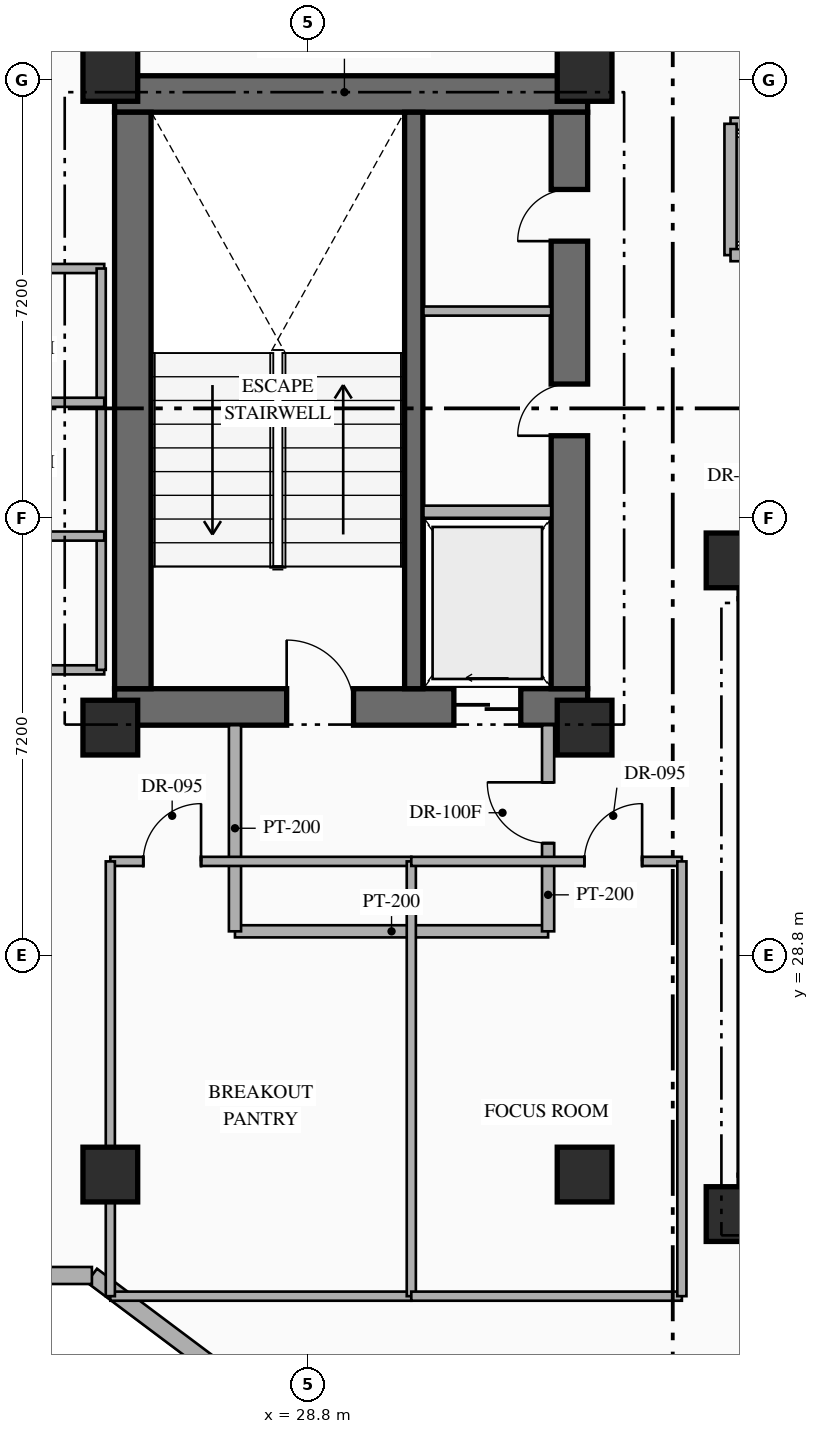
"""IFC4 building model, lengths in metres.
Left out: names, types, materials, properties, quantities, classifications, styles, units other than length and angle.
Written with IfcOpenShell. Run it as: python <this file> out.ifc"""

import sys

from ifc_helpers import new_model, si_unit, direction, frame, frame_2d, origin, origin_2d, place, context, subcontext, project, spatial, rectangle, hollow_rectangle, extrude, element, fill, save


model = new_model("IFC4")
c1 = context("Model", 3, precision=1e-05, world=origin(), true_north=direction((0.0, 1.0)))
c2 = subcontext(c1, "Body", "Model", "MODEL_VIEW")
j1 = project(units=[si_unit("LENGTHUNIT", "METRE"), si_unit("PLANEANGLEUNIT", "RADIAN")], contexts=[c1])
p1 = place(None, origin())
s1 = spatial("IfcSite", under=j1, at=p1, CompositionType="ELEMENT")
p2 = place(p1, origin())
s2 = spatial("IfcBuilding", under=s1, at=p2, CompositionType="ELEMENT")
p3 = place(p2, frame((0.0, 0.0, 122.85)))
s3 = spatial("IfcBuildingStorey", under=s2, at=p3, CompositionType="ELEMENT", Elevation=122.85)
p4 = place(p3, frame((25.62, 32.89, 0.0), z_axis=(0.0, 0.0, 1.0), x_axis=(1.0, 0.0, 0.0)))
e1 = element("IfcWall", 1, at=p4, inside=s3, PredefinedType="SHEAR", context=c2, shape_type="SweptSolid", body=[
    extrude(rectangle(XDim=7.78, YDim=0.6, at=frame_2d((3.89, 0.0))), origin(), (0.0, 0.0, 1.0), 3.6),
])
p5 = place(p4, frame((2.83, 0.0, 0.0)))
e2 = element("IfcOpeningElement", 2, at=p5, cuts=e1, PredefinedType="OPENING", context=c2, shape_type="SweptSolid", body=[
    extrude(rectangle(XDim=1.1, YDim=2.2, at=frame_2d((0.55, 1.1))), frame((0.0, 0.31, 0.0), z_axis=(0.0, -1.0, 0.0), x_axis=(1.0, 0.0, 0.0)), (0.0, 0.0, 1.0), 0.62),
])
p6 = place(p4, frame((5.58, 0.0, 0.0)))
e3 = element("IfcOpeningElement", 3, at=p6, cuts=e1, PredefinedType="OPENING", context=c2, shape_type="SweptSolid", body=[
    extrude(rectangle(XDim=1.1, YDim=2.15, at=frame_2d((0.55, 1.075))), frame((0.0, 0.31, 0.0), z_axis=(0.0, -1.0, 0.0), x_axis=(1.0, 0.0, 0.0)), (0.0, 0.0, 1.0), 0.62),
])
p7 = place(p3, frame((25.62, 42.97, 0.0), z_axis=(0.0, 0.0, 1.0), x_axis=(1.0, 0.0, 0.0)))
e4 = element("IfcWall", 4, at=p7, inside=s3, PredefinedType="SHEAR", context=c2, shape_type="SweptSolid", body=[
    extrude(rectangle(XDim=7.78, YDim=0.6, at=frame_2d((3.89, 0.0))), origin(), (0.0, 0.0, 1.0), 3.6),
])
p8 = place(p3, frame((25.92, 33.19, 0.0), z_axis=(0.0, 0.0, 1.0), x_axis=(0.0, 1.0, 0.0)))
e5 = element("IfcWall", 5, at=p8, inside=s3, PredefinedType="SHEAR", context=c2, shape_type="SweptSolid", body=[
    extrude(rectangle(XDim=9.48, YDim=0.6, at=frame_2d((4.74, 0.0))), origin(), (0.0, 0.0, 1.0), 3.6),
])
p9 = place(p3, frame((33.1, 33.19, 0.0), z_axis=(0.0, 0.0, 1.0), x_axis=(0.0, 1.0, 0.0)))
e6 = element("IfcWall", 6, at=p9, inside=s3, PredefinedType="SHEAR", context=c2, shape_type="SweptSolid", body=[
    extrude(rectangle(XDim=9.48, YDim=0.6, at=frame_2d((4.74, 0.0))), origin(), (0.0, 0.0, 1.0), 3.6),
])
p10 = place(p9, frame((4.16, 0.0, 0.0)))
e7 = element("IfcOpeningElement", 7, at=p10, cuts=e6, PredefinedType="OPENING", context=c2, shape_type="SweptSolid", body=[
    extrude(rectangle(XDim=0.85, YDim=2.08, at=frame_2d((0.425, 1.04))), frame((0.0, 0.31, 0.0), z_axis=(0.0, -1.0, 0.0), x_axis=(1.0, 0.0, 0.0)), (0.0, 0.0, 1.0), 0.62),
])
p11 = place(p9, frame((7.36, 0.0, 0.0)))
e8 = element("IfcOpeningElement", 8, at=p11, cuts=e6, PredefinedType="OPENING", context=c2, shape_type="SweptSolid", body=[
    extrude(rectangle(XDim=0.85, YDim=2.08, at=frame_2d((0.425, 1.04))), frame((0.0, 0.31, 0.0), z_axis=(0.0, -1.0, 0.0), x_axis=(1.0, 0.0, 0.0)), (0.0, 0.0, 1.0), 0.62),
])
p12 = place(p3, frame((30.54, 33.19, 0.0), z_axis=(0.0, 0.0, 1.0), x_axis=(0.0, 1.0, 0.0)))
e9 = element("IfcWall", 9, at=p12, inside=s3, PredefinedType="SHEAR", context=c2, shape_type="SweptSolid", body=[
    extrude(rectangle(XDim=9.48, YDim=0.3, at=frame_2d((4.74, 0.0))), origin(), (0.0, 0.0, 1.0), 3.6),
])
p13 = place(p3, frame((35.89, 24.89, 0.0), z_axis=(0.0, 0.0, 1.0), x_axis=(1.0, 0.0, 0.0)))
e10 = element("IfcWall", 10, at=p13, inside=s3, PredefinedType="SHEAR", context=c2, shape_type="SweptSolid", body=[
    extrude(rectangle(XDim=7.76, YDim=0.6, at=frame_2d((3.88, 0.0))), origin(), (0.0, 0.0, 1.0), 3.6),
])
p14 = place(p3, frame((35.89, 34.97, 0.0), z_axis=(0.0, 0.0, 1.0), x_axis=(1.0, 0.0, 0.0)))
e11 = element("IfcWall", 11, at=p14, inside=s3, PredefinedType="SHEAR", context=c2, shape_type="SweptSolid", body=[
    extrude(rectangle(XDim=7.76, YDim=0.6, at=frame_2d((3.88, 0.0))), origin(), (0.0, 0.0, 1.0), 3.6),
])
p15 = place(p14, frame((2.66, 0.0, 0.0)))
e12 = element("IfcOpeningElement", 12, at=p15, cuts=e11, PredefinedType="OPENING", context=c2, shape_type="SweptSolid", body=[
    extrude(rectangle(XDim=1.1, YDim=2.2, at=frame_2d((0.55, 1.1))), frame((0.0, 0.31, 0.0), z_axis=(0.0, -1.0, 0.0), x_axis=(1.0, 0.0, 0.0)), (0.0, 0.0, 1.0), 0.62),
])
p16 = place(p14, frame((5.56, 0.0, 0.0)))
e13 = element("IfcOpeningElement", 13, at=p16, cuts=e11, PredefinedType="OPENING", context=c2, shape_type="SweptSolid", body=[
    extrude(rectangle(XDim=1.12, YDim=2.15, at=frame_2d((0.56, 1.075))), frame((0.0, 0.31, 0.0), z_axis=(0.0, -1.0, 0.0), x_axis=(1.0, 0.0, 0.0)), (0.0, 0.0, 1.0), 0.62),
])
p17 = place(p3, frame((36.19, 25.19, 0.0), z_axis=(0.0, 0.0, 1.0), x_axis=(0.0, 1.0, 0.0)))
e14 = element("IfcWall", 14, at=p17, inside=s3, PredefinedType="SHEAR", context=c2, shape_type="SweptSolid", body=[
    extrude(rectangle(XDim=9.48, YDim=0.6, at=frame_2d((4.74, 0.0))), origin(), (0.0, 0.0, 1.0), 3.6),
])
for number, where, z_axis, x_axis in (
    (15, (25.55, 32.55, 0.0), (0.0, 0.0, 1.0), (1.0, 0.0, 0.0)),
    (16, (33.35, 32.55, 0.0), (0.0, 0.0, 1.0), (1.0, 0.0, 0.0)),
    (17, (25.55, 43.3, 0.0), (0.0, 0.0, 1.0), (1.0, 0.0, 0.0)),
    (18, (33.35, 43.3, 0.0), (0.0, 0.0, 1.0), (1.0, 0.0, 0.0)),
    (19, (35.8, 24.55, 0.0), (0.0, 0.0, 1.0), (1.0, 0.0, 0.0)),
    (20, (35.8, 35.3, 0.0), (0.0, 0.0, 1.0), (1.0, 0.0, 0.0)),
):
    element("IfcColumn", number, at=place(p3, frame(where, z_axis=z_axis, x_axis=x_axis)), inside=s3, PredefinedType="COLUMN", context=c2, shape_type="SweptSolid", body=[
        extrude(rectangle(XDim=0.9, YDim=0.9, at=origin_2d()), origin(), (0.0, 0.0, 1.0), 3.6),
    ])
for number, where, z_axis, x_axis in (
    (21, (25.55, 25.2, 0.0), (0.0, 0.0, 1.0), (1.0, 0.0, 0.0)),
    (22, (33.35, 25.2, 0.0), (0.0, 0.0, 1.0), (1.0, 0.0, 0.0)),
):
    element("IfcColumn", number, at=place(p3, frame(where, z_axis=z_axis, x_axis=x_axis)), inside=s3, PredefinedType="COLUMN", context=c2, shape_type="SweptSolid", body=[
        extrude(hollow_rectangle(XDim=0.9, YDim=0.9, WallThickness=0.036, at=origin_2d()), origin(), (0.0, 0.0, 1.0), 3.6),
    ])
p18 = place(p3, frame((53.318, 2.487, 0.0), z_axis=(0.0, 0.0, 1.0), x_axis=(-0.800004174678, 0.599994433723, 0.0)))
e23 = element("IfcWall", 23, at=p18, inside=s3, PredefinedType="STANDARD", context=c2, shape_type="SweptSolid", body=[
    extrude(rectangle(XDim=35.089, YDim=0.28, at=frame_2d((17.544, 0.0))), origin(), (0.0, 0.0, 1.0), 3.35),
])
p19 = place(p3, frame((25.247, 23.54, 0.0), z_axis=(0.0, 0.0, 1.0), x_axis=(-1.0, 0.0, 0.0)))
e24 = element("IfcWall", 24, at=p19, inside=s3, PredefinedType="STANDARD", context=c2, shape_type="SweptSolid", body=[
    extrude(rectangle(XDim=6.747, YDim=0.28, at=frame_2d((3.374, 0.0))), origin(), (0.0, 0.0, 1.0), 3.35),
])
p20 = place(p3, frame((30.7, 36.1, 0.0), z_axis=(0.0, 0.0, 1.0), x_axis=(1.0, 0.0, 0.0)))
e25 = element("IfcWall", 25, at=p20, inside=s3, PredefinedType="STANDARD", context=c2, shape_type="SweptSolid", body=[
    extrude(rectangle(XDim=2.1, YDim=0.2, at=frame_2d((1.05, 0.0))), origin(), (0.0, 0.0, 1.0), 3.35),
])
p21 = place(p3, frame((30.7, 39.4, 0.0), z_axis=(0.0, 0.0, 1.0), x_axis=(1.0, 0.0, 0.0)))
e26 = element("IfcWall", 26, at=p21, inside=s3, PredefinedType="PARTITIONING", context=c2, shape_type="SweptSolid", body=[
    extrude(rectangle(XDim=2.1, YDim=0.15, at=frame_2d((1.05, 0.0))), origin(), (0.0, 0.0, 1.0), 3.35),
])
p22 = place(p3, frame((27.6, 29.2, 0.0), z_axis=(0.0, 0.0, 1.0), x_axis=(1.0, 0.0, 0.0)))
e27 = element("IfcWall", 27, at=p22, inside=s3, PredefinedType="STANDARD", context=c2, shape_type="SweptSolid", body=[
    extrude(rectangle(XDim=5.15, YDim=0.2, at=frame_2d((2.575, 0.0))), origin(), (0.0, 0.0, 1.0), 3.35),
])
p23 = place(p3, frame((27.6, 29.2, 0.0), z_axis=(0.0, 0.0, 1.0), x_axis=(0.0, 1.0, 0.0)))
e28 = element("IfcWall", 28, at=p23, inside=s3, PredefinedType="STANDARD", context=c2, shape_type="SweptSolid", body=[
    extrude(rectangle(XDim=3.39, YDim=0.2, at=frame_2d((1.695, 0.0))), origin(), (0.0, 0.0, 1.0), 3.35),
])
p24 = place(p3, frame((32.75, 29.2, 0.0), z_axis=(0.0, 0.0, 1.0), x_axis=(0.0, 1.0, 0.0)))
e29 = element("IfcWall", 29, at=p24, inside=s3, PredefinedType="STANDARD", context=c2, shape_type="SweptSolid", body=[
    extrude(rectangle(XDim=3.39, YDim=0.2, at=frame_2d((1.695, 0.0))), origin(), (0.0, 0.0, 1.0), 3.35),
])
p25 = place(p24, frame((1.45, 0.0, 0.0)))
e30 = element("IfcOpeningElement", 30, at=p25, cuts=e29, PredefinedType="OPENING", context=c2, shape_type="SweptSolid", body=[
    extrude(rectangle(XDim=1.0, YDim=2.2, at=frame_2d((0.5, 1.1))), frame((0.0, 0.11, 0.0), z_axis=(0.0, -1.0, 0.0), x_axis=(1.0, 0.0, 0.0)), (0.0, 0.0, 1.0), 0.22),
])
p26 = place(p3, frame((35.75, 42.48, 0.0), z_axis=(0.0, 0.0, 1.0), x_axis=(1.0, 0.0, 0.0)))
e31 = element("IfcWall", 31, at=p26, inside=s3, PredefinedType="STANDARD", context=c2, shape_type="SweptSolid", body=[
    extrude(rectangle(XDim=9.11, YDim=0.2, at=frame_2d((4.555, 0.0))), origin(), (0.0, 0.0, 1.0), 3.35),
])
p27 = place(p3, frame((35.75, 40.32, 0.0), z_axis=(0.0, 0.0, 1.0), x_axis=(0.0, 1.0, 0.0)))
e32 = element("IfcWall", 32, at=p27, inside=s3, PredefinedType="STANDARD", context=c2, shape_type="SweptSolid", body=[
    extrude(rectangle(XDim=2.16, YDim=0.2, at=frame_2d((1.08, 0.0))), origin(), (0.0, 0.0, 1.0), 3.35),
])
p28 = place(p3, frame((35.75, 40.32, 0.0), z_axis=(0.0, 0.0, 1.0), x_axis=(1.0, 0.0, 0.0)))
e33 = element("IfcWall", 33, at=p28, inside=s3, PredefinedType="STANDARD", context=c2, shape_type="SweptSolid", body=[
    extrude(rectangle(XDim=9.11, YDim=0.2, at=frame_2d((4.555, 0.0))), origin(), (0.0, 0.0, 1.0), 3.35),
])
p29 = place(p28, frame((0.53, 0.0, 0.0)))
e34 = element("IfcOpeningElement", 34, at=p29, cuts=e33, PredefinedType="OPENING", context=c2, shape_type="SweptSolid", body=[
    extrude(rectangle(XDim=1.1, YDim=2.18, at=frame_2d((0.55, 1.09))), frame((0.0, 0.11, 0.0), z_axis=(0.0, -1.0, 0.0), x_axis=(1.0, 0.0, 0.0)), (0.0, 0.0, 1.0), 0.22),
])
p30 = place(p28, frame((2.73, 0.0, 0.0)))
e35 = element("IfcOpeningElement", 35, at=p30, cuts=e33, PredefinedType="OPENING", context=c2, shape_type="SweptSolid", body=[
    extrude(rectangle(XDim=1.1, YDim=2.18, at=frame_2d((0.55, 1.09))), frame((0.0, 0.11, 0.0), z_axis=(0.0, -1.0, 0.0), x_axis=(1.0, 0.0, 0.0)), (0.0, 0.0, 1.0), 0.22),
])
p31 = place(p28, frame((4.93, 0.0, 0.0)))
e36 = element("IfcOpeningElement", 36, at=p31, cuts=e33, PredefinedType="OPENING", context=c2, shape_type="SweptSolid", body=[
    extrude(rectangle(XDim=1.1, YDim=2.18, at=frame_2d((0.55, 1.09))), frame((0.0, 0.11, 0.0), z_axis=(0.0, -1.0, 0.0), x_axis=(1.0, 0.0, 0.0)), (0.0, 0.0, 1.0), 0.22),
])
p32 = place(p28, frame((7.13, 0.0, 0.0)))
e37 = element("IfcOpeningElement", 37, at=p32, cuts=e33, PredefinedType="OPENING", context=c2, shape_type="SweptSolid", body=[
    extrude(rectangle(XDim=1.1, YDim=2.18, at=frame_2d((0.55, 1.09))), frame((0.0, 0.11, 0.0), z_axis=(0.0, -1.0, 0.0), x_axis=(1.0, 0.0, 0.0)), (0.0, 0.0, 1.0), 0.22),
])
for number, where, z_axis, x_axis in (
    (38, (22.15, 33.5, 0.0), (0.0, 0.0, 1.0), (1.0, 0.0, 0.0)),
    (39, (22.15, 40.1, 0.0), (0.0, 0.0, 1.0), (1.0, 0.0, 0.0)),
):
    element("IfcWall", number, at=place(p3, frame(where, z_axis=z_axis, x_axis=x_axis)), inside=s3, PredefinedType="PARTITIONING", context=c2, shape_type="SweptSolid", body=[
        extrude(rectangle(XDim=3.3, YDim=0.15, at=frame_2d((1.65, 0.0))), origin(), (0.0, 0.0, 1.0), 3.35),
    ])
p33 = place(p3, frame((25.4, 33.5, 0.0), z_axis=(0.0, 0.0, 1.0), x_axis=(0.0, 1.0, 0.0)))
e40 = element("IfcWall", 40, at=p33, inside=s3, PredefinedType="PARTITIONING", context=c2, shape_type="SweptSolid", body=[
    extrude(rectangle(XDim=6.6, YDim=0.15, at=frame_2d((3.3, 0.0))), origin(), (0.0, 0.0, 1.0), 3.35),
])
for number, where, z_axis, x_axis in (
    (41, (22.15, 35.7, 0.0), (0.0, 0.0, 1.0), (1.0, 0.0, 0.0)),
    (42, (22.15, 37.9, 0.0), (0.0, 0.0, 1.0), (1.0, 0.0, 0.0)),
):
    element("IfcWall", number, at=place(p3, frame(where, z_axis=z_axis, x_axis=x_axis)), inside=s3, PredefinedType="PARTITIONING", context=c2, shape_type="SweptSolid", body=[
        extrude(rectangle(XDim=3.3, YDim=0.15, at=frame_2d((1.65, 0.0))), origin(), (0.0, 0.0, 1.0), 3.35),
    ])
p34 = place(p3, frame((25.55, 23.2, 0.0), z_axis=(0.0, 0.0, 1.0), x_axis=(1.0, 0.0, 0.0)))
e43 = element("IfcWall", 43, at=p34, inside=s3, PredefinedType="PARTITIONING", context=c2, shape_type="SweptSolid", body=[
    extrude(rectangle(XDim=4.95, YDim=0.15, at=frame_2d((2.475, 0.0))), origin(), (0.0, 0.0, 1.0), 3.35),
])
p35 = place(p3, frame((25.55, 30.35, 0.0), z_axis=(0.0, 0.0, 1.0), x_axis=(1.0, 0.0, 0.0)))
e44 = element("IfcWall", 44, at=p35, inside=s3, PredefinedType="PARTITIONING", context=c2, shape_type="SweptSolid", body=[
    extrude(rectangle(XDim=4.95, YDim=0.15, at=frame_2d((2.475, 0.0))), origin(), (0.0, 0.0, 1.0), 3.35),
])
p36 = place(p35, frame((0.542, 0.0, 0.0)))
e45 = element("IfcOpeningElement", 45, at=p36, cuts=e44, PredefinedType="OPENING", context=c2, shape_type="SweptSolid", body=[
    extrude(rectangle(XDim=0.95, YDim=2.15, at=frame_2d((0.475, 1.075))), frame((0.0, 0.085, 0.0), z_axis=(0.0, -1.0, 0.0), x_axis=(1.0, 0.0, 0.0)), (0.0, 0.0, 1.0), 0.17),
])
p37 = place(p3, frame((25.55, 23.2, 0.0), z_axis=(0.0, 0.0, 1.0), x_axis=(0.0, 1.0, 0.0)))
e46 = element("IfcWall", 46, at=p37, inside=s3, PredefinedType="PARTITIONING", context=c2, shape_type="SweptSolid", body=[
    extrude(rectangle(XDim=7.15, YDim=0.15, at=frame_2d((3.575, 0.0))), origin(), (0.0, 0.0, 1.0), 2.695),
])
p38 = place(p3, frame((30.5, 23.2, 0.0), z_axis=(0.0, 0.0, 1.0), x_axis=(0.0, 1.0, 0.0)))
e47 = element("IfcWall", 47, at=p38, inside=s3, PredefinedType="PARTITIONING", context=c2, shape_type="SweptSolid", body=[
    extrude(rectangle(XDim=7.15, YDim=0.15, at=frame_2d((3.575, 0.0))), origin(), (0.0, 0.0, 1.0), 3.35),
])
p39 = place(p3, frame((30.5, 23.2, 0.0), z_axis=(0.0, 0.0, 1.0), x_axis=(1.0, 0.0, 0.0)))
e48 = element("IfcWall", 48, at=p39, inside=s3, PredefinedType="PARTITIONING", context=c2, shape_type="SweptSolid", body=[
    extrude(rectangle(XDim=4.45, YDim=0.15, at=frame_2d((2.225, 0.0))), origin(), (0.0, 0.0, 1.0), 3.35),
])
p40 = place(p3, frame((30.5, 30.35, 0.0), z_axis=(0.0, 0.0, 1.0), x_axis=(1.0, 0.0, 0.0)))
e49 = element("IfcWall", 49, at=p40, inside=s3, PredefinedType="PARTITIONING", context=c2, shape_type="SweptSolid", body=[
    extrude(rectangle(XDim=4.45, YDim=0.15, at=frame_2d((2.225, 0.0))), origin(), (0.0, 0.0, 1.0), 3.35),
])
p41 = place(p40, frame((2.846, 0.0, 0.0)))
e50 = element("IfcOpeningElement", 50, at=p41, cuts=e49, PredefinedType="OPENING", context=c2, shape_type="SweptSolid", body=[
    extrude(rectangle(XDim=0.95, YDim=2.15, at=frame_2d((0.475, 1.075))), frame((0.0, 0.085, 0.0), z_axis=(0.0, -1.0, 0.0), x_axis=(1.0, 0.0, 0.0)), (0.0, 0.0, 1.0), 0.17),
])
p42 = place(p3, frame((34.95, 23.2, 0.0), z_axis=(0.0, 0.0, 1.0), x_axis=(0.0, 1.0, 0.0)))
e51 = element("IfcWall", 51, at=p42, inside=s3, PredefinedType="PARTITIONING", context=c2, shape_type="SweptSolid", body=[
    extrude(rectangle(XDim=7.15, YDim=0.15, at=frame_2d((3.575, 0.0))), origin(), (0.0, 0.0, 1.0), 3.35),
])
p43 = place(p5, origin())
e52 = element("IfcDoor", 52, at=p43, inside=s3, OperationType="SINGLE_SWING_LEFT", PredefinedType="DOOR", context=c2, shape_type="SweptSolid", body=[
    extrude(rectangle(XDim=1.1, YDim=2.2, at=frame_2d((0.55, 1.1))), frame((0.0, 0.025, 0.0), z_axis=(0.0, -1.0, 0.0), x_axis=(1.0, 0.0, 0.0)), (0.0, 0.0, 1.0), 0.05),
])
fill(e2, e52)
p44 = place(p6, origin())
e53 = element("IfcDoor", 53, at=p44, inside=s3, OperationType="SLIDING_TO_LEFT", PredefinedType="USERDEFINED", context=c2, shape_type="SweptSolid", body=[
    extrude(rectangle(XDim=1.1, YDim=2.15, at=frame_2d((0.55, 1.075))), frame((0.0, 0.025, 0.0), z_axis=(0.0, -1.0, 0.0), x_axis=(1.0, 0.0, 0.0)), (0.0, 0.0, 1.0), 0.05),
])
fill(e3, e53)
p45 = place(p10, origin())
e54 = element("IfcDoor", 54, at=p45, inside=s3, OperationType="SINGLE_SWING_LEFT", PredefinedType="DOOR", context=c2, shape_type="SweptSolid", body=[
    extrude(rectangle(XDim=0.85, YDim=2.08, at=frame_2d((0.425, 1.04))), frame((0.0, 0.025, 0.0), z_axis=(0.0, -1.0, 0.0), x_axis=(1.0, 0.0, 0.0)), (0.0, 0.0, 1.0), 0.05),
])
fill(e7, e54)
p46 = place(p11, origin())
e55 = element("IfcDoor", 55, at=p46, inside=s3, OperationType="SINGLE_SWING_LEFT", PredefinedType="DOOR", context=c2, shape_type="SweptSolid", body=[
    extrude(rectangle(XDim=0.85, YDim=2.08, at=frame_2d((0.425, 1.04))), frame((0.0, 0.025, 0.0), z_axis=(0.0, -1.0, 0.0), x_axis=(1.0, 0.0, 0.0)), (0.0, 0.0, 1.0), 0.05),
])
fill(e8, e55)
p47 = place(p25, origin())
e56 = element("IfcDoor", 56, at=p47, inside=s3, OperationType="SINGLE_SWING_RIGHT", PredefinedType="DOOR", context=c2, shape_type="SweptSolid", body=[
    extrude(rectangle(XDim=1.0, YDim=2.2, at=frame_2d((0.5, 1.1))), frame((0.0, 0.025, 0.0), z_axis=(0.0, -1.0, 0.0), x_axis=(1.0, 0.0, 0.0)), (0.0, 0.0, 1.0), 0.05),
])
fill(e30, e56)
p48 = place(p36, origin())
e57 = element("IfcDoor", 57, at=p48, inside=s3, OperationType="SINGLE_SWING_RIGHT", PredefinedType="DOOR", context=c2, shape_type="SweptSolid", body=[
    extrude(rectangle(XDim=0.95, YDim=2.15, at=frame_2d((0.475, 1.075))), frame((0.0, 0.025, 0.0), z_axis=(0.0, -1.0, 0.0), x_axis=(1.0, 0.0, 0.0)), (0.0, 0.0, 1.0), 0.05),
])
fill(e45, e57)
p49 = place(p41, origin())
e58 = element("IfcDoor", 58, at=p49, inside=s3, OperationType="SINGLE_SWING_RIGHT", PredefinedType="DOOR", context=c2, shape_type="SweptSolid", body=[
    extrude(rectangle(XDim=0.95, YDim=2.15, at=frame_2d((0.475, 1.075))), frame((0.0, 0.025, 0.0), z_axis=(0.0, -1.0, 0.0), x_axis=(1.0, 0.0, 0.0)), (0.0, 0.0, 1.0), 0.05),
])
fill(e50, e58)
save(model, sys.argv[1])
